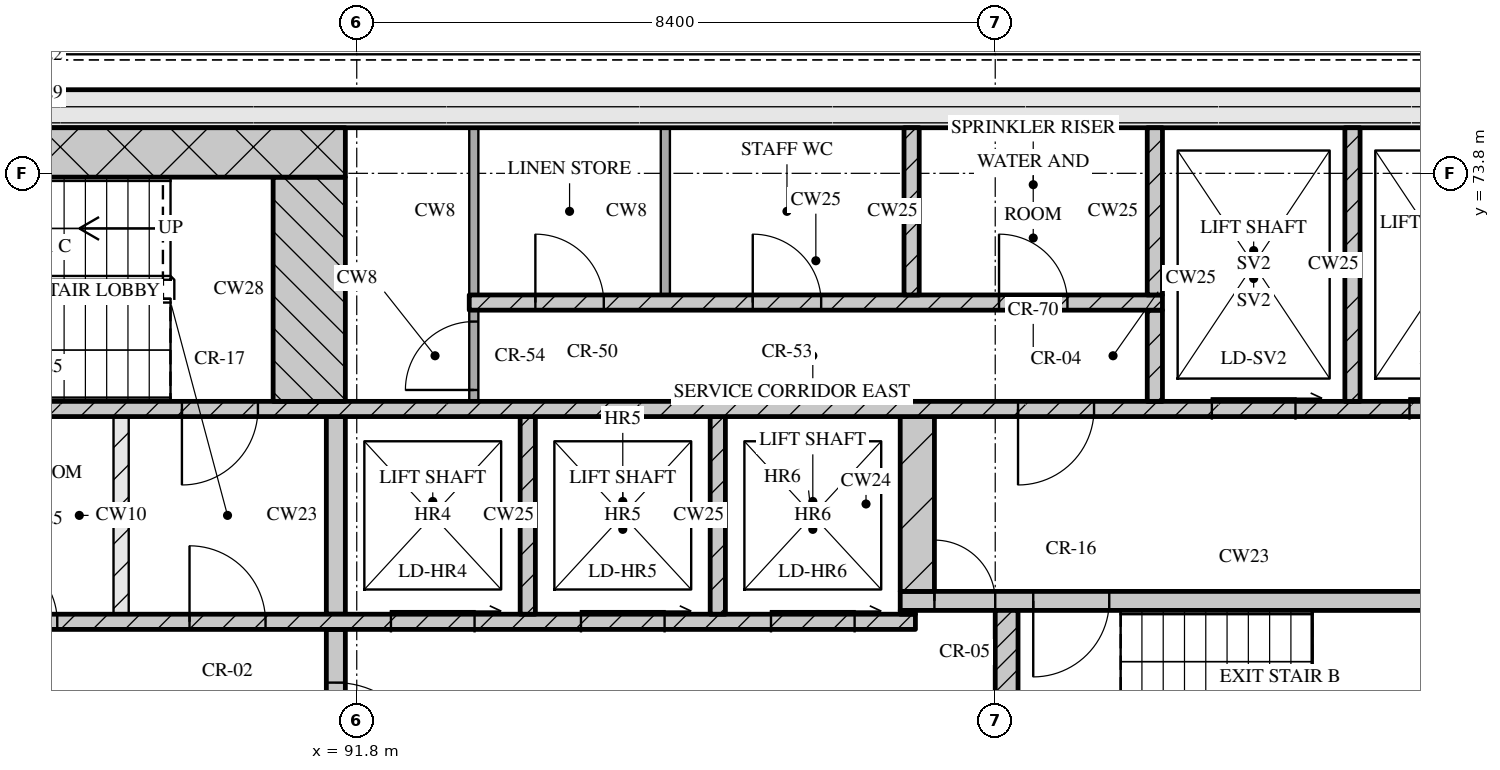
"""IFC4 building model, lengths in metres.
Left out: names, types, materials, properties, quantities, classifications, styles, units other than length and angle.
Written with IfcOpenShell. Run it as: python <this file> out.ifc"""

import sys

from ifc_helpers import new_model, si_unit, direction, frame, frame_2d, origin, place, context, subcontext, project, spatial, rectangle, extrude, element, fill, save


model = new_model("IFC4")
c1 = context("Model", 3, precision=1e-05, world=origin(), true_north=direction((0.0, 1.0)))
c2 = subcontext(c1, "Body", "Model", "MODEL_VIEW")
j1 = project(units=[si_unit("LENGTHUNIT", "METRE"), si_unit("PLANEANGLEUNIT", "RADIAN")], contexts=[c1])
p1 = place(None, origin())
s1 = spatial("IfcSite", under=j1, at=p1, CompositionType="ELEMENT")
p2 = place(p1, origin())
s2 = spatial("IfcBuilding", under=s1, at=p2, CompositionType="ELEMENT")
p3 = place(p2, frame((0.0, 0.0, 263.55)))
s3 = spatial("IfcBuildingStorey", under=s2, at=p3, CompositionType="ELEMENT", Elevation=263.55)
p4 = place(p3, frame((67.3, 74.65, 0.0), z_axis=(0.0, 0.0, 1.0), x_axis=(1.0, 0.0, 0.0)))
e1 = element("IfcWall", 1, at=p4, inside=s3, PredefinedType="SOLIDWALL", context=c2, shape_type="SweptSolid", body=[
    extrude(rectangle(XDim=40.6, YDim=0.5, at=frame_2d((20.3, 0.0))), origin(), (0.0, 0.0, 1.0), 3.32),
])
p5 = place(p3, frame((91.525, 65.2, 0.0), z_axis=(0.0, 0.0, 1.0), x_axis=(0.0, 1.0, 0.0)))
e2 = element("IfcWall", 2, at=p5, inside=s3, PredefinedType="SOLIDWALL", context=c2, shape_type="SweptSolid", body=[
    extrude(rectangle(XDim=2.6, YDim=0.25, at=frame_2d((1.3, 0.0))), origin(), (0.0, 0.0, 1.0), 3.32),
])
p6 = place(p5, frame((0.7, 0.0, 0.0)))
e3 = element("IfcOpeningElement", 3, at=p6, cuts=e2, PredefinedType="OPENING", context=c2, shape_type="SweptSolid", body=[
    extrude(rectangle(XDim=1.2, YDim=2.1, at=frame_2d((0.6, 1.05))), frame((0.0, 0.135, 0.0), z_axis=(0.0, -1.0, 0.0), x_axis=(1.0, 0.0, 0.0)), (0.0, 0.0, 1.0), 0.27),
])
p7 = place(p3, frame((100.35, 65.2, 0.0), z_axis=(0.0, 0.0, 1.0), x_axis=(0.0, 1.0, 0.0)))
e4 = element("IfcWall", 4, at=p7, inside=s3, PredefinedType="SOLIDWALL", context=c2, shape_type="SweptSolid", body=[
    extrude(rectangle(XDim=2.85, YDim=0.3, at=frame_2d((1.425, 0.0))), origin(), (0.0, 0.0, 1.0), 3.32),
])
p8 = place(p3, frame((76.05, 67.9, 0.0), z_axis=(0.0, 0.0, 1.0), x_axis=(1.0, 0.0, 0.0)))
e5 = element("IfcWall", 5, at=p8, inside=s3, PredefinedType="SOLIDWALL", context=c2, shape_type="SweptSolid", body=[
    extrude(rectangle(XDim=23.1, YDim=0.2, at=frame_2d((11.55, 0.0))), origin(), (0.0, 0.0, 1.0), 3.32),
])
p9 = place(p8, frame((1.4, 0.0, 0.0)))
e6 = element("IfcOpeningElement", 6, at=p9, cuts=e5, PredefinedType="OPENING", context=c2, shape_type="SweptSolid", body=[
    extrude(rectangle(XDim=0.9, YDim=2.1, at=frame_2d((0.45, 1.05))), frame((0.0, 0.11, 0.0), z_axis=(0.0, -1.0, 0.0), x_axis=(1.0, 0.0, 0.0)), (0.0, 0.0, 1.0), 0.22),
])
p10 = place(p8, frame((5.11, 0.0, 0.0)))
e7 = element("IfcOpeningElement", 7, at=p10, cuts=e5, PredefinedType="OPENING", context=c2, shape_type="SweptSolid", body=[
    extrude(rectangle(XDim=0.9, YDim=2.1, at=frame_2d((0.45, 1.05))), frame((0.0, 0.11, 0.0), z_axis=(0.0, -1.0, 0.0), x_axis=(1.0, 0.0, 0.0)), (0.0, 0.0, 1.0), 0.22),
])
p11 = place(p8, frame((8.45, 0.0, 0.0)))
e8 = element("IfcOpeningElement", 8, at=p11, cuts=e5, PredefinedType="OPENING", context=c2, shape_type="SweptSolid", body=[
    extrude(rectangle(XDim=0.9, YDim=2.1, at=frame_2d((0.45, 1.05))), frame((0.0, 0.11, 0.0), z_axis=(0.0, -1.0, 0.0), x_axis=(1.0, 0.0, 0.0)), (0.0, 0.0, 1.0), 0.22),
])
p12 = place(p8, frame((10.91, 0.0, 0.0)))
e9 = element("IfcOpeningElement", 9, at=p12, cuts=e5, PredefinedType="OPENING", context=c2, shape_type="SweptSolid", body=[
    extrude(rectangle(XDim=0.9, YDim=2.1, at=frame_2d((0.45, 1.05))), frame((0.0, 0.11, 0.0), z_axis=(0.0, -1.0, 0.0), x_axis=(1.0, 0.0, 0.0)), (0.0, 0.0, 1.0), 0.22),
])
p13 = place(p8, frame((13.55, 0.0, 0.0)))
e10 = element("IfcOpeningElement", 10, at=p13, cuts=e5, PredefinedType="OPENING", context=c2, shape_type="SweptSolid", body=[
    extrude(rectangle(XDim=1.0, YDim=2.1, at=frame_2d((0.5, 1.05))), frame((0.0, 0.11, 0.0), z_axis=(0.0, -1.0, 0.0), x_axis=(1.0, 0.0, 0.0)), (0.0, 0.0, 1.0), 0.22),
])
p14 = place(p8, frame((16.2, 0.0, 0.0)))
e11 = element("IfcOpeningElement", 11, at=p14, cuts=e5, PredefinedType="OPENING", context=c2, shape_type="SweptSolid", body=[
    extrude(rectangle(XDim=1.1, YDim=2.1, at=frame_2d((0.55, 1.05))), frame((0.0, 0.11, 0.0), z_axis=(0.0, -1.0, 0.0), x_axis=(1.0, 0.0, 0.0)), (0.0, 0.0, 1.0), 0.22),
])
p15 = place(p8, frame((18.7, 0.0, 0.0)))
e12 = element("IfcOpeningElement", 12, at=p15, cuts=e5, PredefinedType="OPENING", context=c2, shape_type="SweptSolid", body=[
    extrude(rectangle(XDim=1.1, YDim=2.1, at=frame_2d((0.55, 1.05))), frame((0.0, 0.11, 0.0), z_axis=(0.0, -1.0, 0.0), x_axis=(1.0, 0.0, 0.0)), (0.0, 0.0, 1.0), 0.22),
])
p16 = place(p8, frame((21.2, 0.0, 0.0)))
e13 = element("IfcOpeningElement", 13, at=p16, cuts=e5, PredefinedType="OPENING", context=c2, shape_type="SweptSolid", body=[
    extrude(rectangle(XDim=1.1, YDim=2.1, at=frame_2d((0.55, 1.05))), frame((0.0, 0.11, 0.0), z_axis=(0.0, -1.0, 0.0), x_axis=(1.0, 0.0, 0.0)), (0.0, 0.0, 1.0), 0.22),
])
p17 = place(p3, frame((88.7, 68.0, 0.0), z_axis=(0.0, 0.0, 1.0), x_axis=(0.0, 1.0, 0.0)))
e14 = element("IfcWall", 14, at=p17, inside=s3, PredefinedType="PARTITIONING", context=c2, shape_type="SweptSolid", body=[
    extrude(rectangle(XDim=2.6, YDim=0.2, at=frame_2d((1.3, 0.0))), origin(), (0.0, 0.0, 1.0), 3.32),
])
p18 = place(p3, frame((91.525, 68.0, 0.0), z_axis=(0.0, 0.0, 1.0), x_axis=(0.0, 1.0, 0.0)))
e15 = element("IfcWall", 15, at=p18, inside=s3, PredefinedType="SOLIDWALL", context=c2, shape_type="SweptSolid", body=[
    extrude(rectangle(XDim=2.6, YDim=0.25, at=frame_2d((1.3, 0.0))), origin(), (0.0, 0.0, 1.0), 3.32),
])
for number, where, z_axis, x_axis in (
    (16, (94.05, 68.0, 0.0), (0.0, 0.0, 1.0), (0.0, 1.0, 0.0)),
    (17, (96.55, 68.0, 0.0), (0.0, 0.0, 1.0), (0.0, 1.0, 0.0)),
):
    element("IfcWall", number, at=place(p3, frame(where, z_axis=z_axis, x_axis=x_axis)), inside=s3, PredefinedType="SOLIDWALL", context=c2, shape_type="SweptSolid", body=[
        extrude(rectangle(XDim=2.6, YDim=0.2, at=frame_2d((1.3, 0.0))), origin(), (0.0, 0.0, 1.0), 3.32),
    ])
p19 = place(p3, frame((98.95, 68.025, 0.0), z_axis=(0.0, 0.0, 1.0), x_axis=(1.0, 0.0, 0.0)))
e18 = element("IfcWall", 18, at=p19, inside=s3, PredefinedType="SOLIDWALL", context=c2, shape_type="SweptSolid", body=[
    extrude(rectangle(XDim=0.2, YDim=0.05, at=frame_2d((0.1, 0.0))), origin(), (0.0, 0.0, 1.0), 3.32),
])
p20 = place(p3, frame((98.95, 68.175, 0.0), z_axis=(0.0, 0.0, 1.0), x_axis=(1.0, 0.0, 0.0)))
e19 = element("IfcWall", 19, at=p20, inside=s3, PredefinedType="SOLIDWALL", context=c2, shape_type="SweptSolid", body=[
    extrude(rectangle(XDim=8.45, YDim=0.25, at=frame_2d((4.225, 0.0))), origin(), (0.0, 0.0, 1.0), 3.32),
])
p21 = place(p20, frame((0.45, 0.0, 0.0)))
e20 = element("IfcOpeningElement", 20, at=p21, cuts=e19, PredefinedType="OPENING", context=c2, shape_type="SweptSolid", body=[
    extrude(rectangle(XDim=0.8, YDim=2.1, at=frame_2d((0.4, 1.05))), frame((0.0, 0.135, 0.0), z_axis=(0.0, -1.0, 0.0), x_axis=(1.0, 0.0, 0.0)), (0.0, 0.0, 1.0), 0.27),
])
p22 = place(p20, frame((1.75, 0.0, 0.0)))
e21 = element("IfcOpeningElement", 21, at=p22, cuts=e19, PredefinedType="OPENING", context=c2, shape_type="SweptSolid", body=[
    extrude(rectangle(XDim=1.0, YDim=2.1, at=frame_2d((0.5, 1.05))), frame((0.0, 0.135, 0.0), z_axis=(0.0, -1.0, 0.0), x_axis=(1.0, 0.0, 0.0)), (0.0, 0.0, 1.0), 0.27),
])
p23 = place(p3, frame((99.175, 68.3, 0.0), z_axis=(0.0, 0.0, 1.0), x_axis=(0.0, 1.0, 0.0)))
e22 = element("IfcWall", 22, at=p23, inside=s3, PredefinedType="SOLIDWALL", context=c2, shape_type="SweptSolid", body=[
    extrude(rectangle(XDim=2.3, YDim=0.45, at=frame_2d((1.15, 0.0))), origin(), (0.0, 0.0, 1.0), 3.32),
])
p24 = place(p3, frame((67.8, 70.7, 0.0), z_axis=(0.0, 0.0, 1.0), x_axis=(1.0, 0.0, 0.0)))
e23 = element("IfcWall", 23, at=p24, inside=s3, PredefinedType="SOLIDWALL", context=c2, shape_type="SweptSolid", body=[
    extrude(rectangle(XDim=39.6, YDim=0.2, at=frame_2d((19.8, 0.0))), origin(), (0.0, 0.0, 1.0), 3.32),
])
p25 = place(p24, frame((0.65, 0.0, 0.0)))
e24 = element("IfcOpeningElement", 24, at=p25, cuts=e23, PredefinedType="OPENING", context=c2, shape_type="SweptSolid", body=[
    extrude(rectangle(XDim=1.1, YDim=2.1, at=frame_2d((0.55, 1.05))), frame((0.0, 0.11, 0.0), z_axis=(0.0, -1.0, 0.0), x_axis=(1.0, 0.0, 0.0)), (0.0, 0.0, 1.0), 0.22),
])
p26 = place(p24, frame((3.25, 0.0, 0.0)))
e25 = element("IfcOpeningElement", 25, at=p26, cuts=e23, PredefinedType="OPENING", context=c2, shape_type="SweptSolid", body=[
    extrude(rectangle(XDim=1.1, YDim=2.1, at=frame_2d((0.55, 1.05))), frame((0.0, 0.11, 0.0), z_axis=(0.0, -1.0, 0.0), x_axis=(1.0, 0.0, 0.0)), (0.0, 0.0, 1.0), 0.22),
])
p27 = place(p24, frame((5.9, 0.0, 0.0)))
e26 = element("IfcOpeningElement", 26, at=p27, cuts=e23, PredefinedType="OPENING", context=c2, shape_type="SweptSolid", body=[
    extrude(rectangle(XDim=1.0, YDim=2.1, at=frame_2d((0.5, 1.05))), frame((0.0, 0.11, 0.0), z_axis=(0.0, -1.0, 0.0), x_axis=(1.0, 0.0, 0.0)), (0.0, 0.0, 1.0), 0.22),
])
p28 = place(p24, frame((21.7, 0.0, 0.0)))
e27 = element("IfcOpeningElement", 27, at=p28, cuts=e23, PredefinedType="OPENING", context=c2, shape_type="SweptSolid", body=[
    extrude(rectangle(XDim=1.0, YDim=2.1, at=frame_2d((0.5, 1.05))), frame((0.0, 0.11, 0.0), z_axis=(0.0, -1.0, 0.0), x_axis=(1.0, 0.0, 0.0)), (0.0, 0.0, 1.0), 0.22),
])
p29 = place(p24, frame((32.7, 0.0, 0.0)))
e28 = element("IfcOpeningElement", 28, at=p29, cuts=e23, PredefinedType="OPENING", context=c2, shape_type="SweptSolid", body=[
    extrude(rectangle(XDim=1.0, YDim=2.1, at=frame_2d((0.5, 1.05))), frame((0.0, 0.11, 0.0), z_axis=(0.0, -1.0, 0.0), x_axis=(1.0, 0.0, 0.0)), (0.0, 0.0, 1.0), 0.22),
])
p30 = place(p24, frame((35.25, 0.0, 0.0)))
e29 = element("IfcOpeningElement", 29, at=p30, cuts=e23, PredefinedType="OPENING", context=c2, shape_type="SweptSolid", body=[
    extrude(rectangle(XDim=1.1, YDim=2.1, at=frame_2d((0.55, 1.05))), frame((0.0, 0.11, 0.0), z_axis=(0.0, -1.0, 0.0), x_axis=(1.0, 0.0, 0.0)), (0.0, 0.0, 1.0), 0.22),
])
p31 = place(p24, frame((37.85, 0.0, 0.0)))
e30 = element("IfcOpeningElement", 30, at=p31, cuts=e23, PredefinedType="OPENING", context=c2, shape_type="SweptSolid", body=[
    extrude(rectangle(XDim=1.1, YDim=2.1, at=frame_2d((0.55, 1.05))), frame((0.0, 0.11, 0.0), z_axis=(0.0, -1.0, 0.0), x_axis=(1.0, 0.0, 0.0)), (0.0, 0.0, 1.0), 0.22),
])
p32 = place(p3, frame((91.175, 70.8, 0.0), z_axis=(0.0, 0.0, 1.0), x_axis=(0.0, 1.0, 0.0)))
e31 = element("IfcWall", 31, at=p32, inside=s3, PredefinedType="SOLIDWALL", context=c2, shape_type="SweptSolid", body=[
    extrude(rectangle(XDim=2.95, YDim=0.95, at=frame_2d((1.475, 0.0))), origin(), (0.0, 0.0, 1.0), 3.32),
])
p33 = place(p3, frame((93.34, 70.8, 0.0), z_axis=(0.0, 0.0, 1.0), x_axis=(0.0, 1.0, 0.0)))
e32 = element("IfcWall", 32, at=p33, inside=s3, PredefinedType="PARTITIONING", context=c2, shape_type="SweptSolid", body=[
    extrude(rectangle(XDim=1.2, YDim=0.12, at=frame_2d((0.6, 0.0))), origin(), (0.0, 0.0, 1.0), 3.32),
])
p34 = place(p33, frame((0.15, 0.0, 0.0)))
e33 = element("IfcOpeningElement", 33, at=p34, cuts=e32, PredefinedType="OPENING", context=c2, shape_type="SweptSolid", body=[
    extrude(rectangle(XDim=0.9, YDim=2.1, at=frame_2d((0.45, 1.05))), frame((0.0, 0.07, 0.0), z_axis=(0.0, -1.0, 0.0), x_axis=(1.0, 0.0, 0.0)), (0.0, 0.0, 1.0), 0.14),
])
p35 = place(p3, frame((102.3, 70.8, 0.0), z_axis=(0.0, 0.0, 1.0), x_axis=(0.0, 1.0, 0.0)))
e34 = element("IfcWall", 34, at=p35, inside=s3, PredefinedType="SOLIDWALL", context=c2, shape_type="SweptSolid", body=[
    extrude(rectangle(XDim=1.2, YDim=0.2, at=frame_2d((0.6, 0.0))), origin(), (0.0, 0.0, 1.0), 3.32),
])
p36 = place(p3, frame((104.9, 70.8, 0.0), z_axis=(0.0, 0.0, 1.0), x_axis=(0.0, 1.0, 0.0)))
e35 = element("IfcWall", 35, at=p36, inside=s3, PredefinedType="SOLIDWALL", context=c2, shape_type="SweptSolid", body=[
    extrude(rectangle(XDim=3.6, YDim=0.2, at=frame_2d((1.8, 0.0))), origin(), (0.0, 0.0, 1.0), 3.32),
])
p37 = place(p3, frame((93.28, 72.1, 0.0), z_axis=(0.0, 0.0, 1.0), x_axis=(1.0, 0.0, 0.0)))
e36 = element("IfcWall", 36, at=p37, inside=s3, PredefinedType="SOLIDWALL", context=c2, shape_type="SweptSolid", body=[
    extrude(rectangle(XDim=9.12, YDim=0.2, at=frame_2d((4.56, 0.0))), origin(), (0.0, 0.0, 1.0), 3.32),
])
p38 = place(p37, frame((0.87, 0.0, 0.0)))
e37 = element("IfcOpeningElement", 37, at=p38, cuts=e36, PredefinedType="OPENING", context=c2, shape_type="SweptSolid", body=[
    extrude(rectangle(XDim=0.9, YDim=2.1, at=frame_2d((0.45, 1.05))), frame((0.0, 0.11, 0.0), z_axis=(0.0, -1.0, 0.0), x_axis=(1.0, 0.0, 0.0)), (0.0, 0.0, 1.0), 0.22),
])
p39 = place(p37, frame((3.73, 0.0, 0.0)))
e38 = element("IfcOpeningElement", 38, at=p39, cuts=e36, PredefinedType="OPENING", context=c2, shape_type="SweptSolid", body=[
    extrude(rectangle(XDim=0.9, YDim=2.1, at=frame_2d((0.45, 1.05))), frame((0.0, 0.11, 0.0), z_axis=(0.0, -1.0, 0.0), x_axis=(1.0, 0.0, 0.0)), (0.0, 0.0, 1.0), 0.22),
])
p40 = place(p37, frame((6.97, 0.0, 0.0)))
e39 = element("IfcOpeningElement", 39, at=p40, cuts=e36, PredefinedType="OPENING", context=c2, shape_type="SweptSolid", body=[
    extrude(rectangle(XDim=0.9, YDim=2.1, at=frame_2d((0.45, 1.05))), frame((0.0, 0.11, 0.0), z_axis=(0.0, -1.0, 0.0), x_axis=(1.0, 0.0, 0.0)), (0.0, 0.0, 1.0), 0.22),
])
for number, where, z_axis, x_axis in (
    (40, (93.34, 72.2, 0.0), (0.0, 0.0, 1.0), (0.0, 1.0, 0.0)),
    (41, (95.86, 72.2, 0.0), (0.0, 0.0, 1.0), (0.0, 1.0, 0.0)),
):
    element("IfcWall", number, at=place(p3, frame(where, z_axis=z_axis, x_axis=x_axis)), inside=s3, PredefinedType="PARTITIONING", context=c2, shape_type="SweptSolid", body=[
        extrude(rectangle(XDim=2.2, YDim=0.12, at=frame_2d((1.1, 0.0))), origin(), (0.0, 0.0, 1.0), 3.32),
    ])
for number, where, z_axis, x_axis in (
    (42, (99.1, 72.2, 0.0), (0.0, 0.0, 1.0), (0.0, 1.0, 0.0)),
    (43, (102.3, 72.2, 0.0), (0.0, 0.0, 1.0), (0.0, 1.0, 0.0)),
):
    element("IfcWall", number, at=place(p3, frame(where, z_axis=z_axis, x_axis=x_axis)), inside=s3, PredefinedType="SOLIDWALL", context=c2, shape_type="SweptSolid", body=[
        extrude(rectangle(XDim=2.2, YDim=0.2, at=frame_2d((1.1, 0.0))), origin(), (0.0, 0.0, 1.0), 3.32),
    ])
p41 = place(p3, frame((83.55, 74.075, 0.0), z_axis=(0.0, 0.0, 1.0), x_axis=(1.0, 0.0, 0.0)))
e44 = element("IfcWall", 44, at=p41, inside=s3, PredefinedType="SOLIDWALL", context=c2, shape_type="SweptSolid", body=[
    extrude(rectangle(XDim=8.1, YDim=0.65, at=frame_2d((4.05, 0.0))), origin(), (0.0, 0.0, 1.0), 3.32),
])
p42 = place(p6, origin())
e45 = element("IfcDoor", 45, at=p42, inside=s3, OperationType="SINGLE_SWING_RIGHT", PredefinedType="DOOR", context=c2, shape_type="SweptSolid", body=[
    extrude(rectangle(XDim=1.2, YDim=2.1, at=frame_2d((0.6, 1.05))), frame((0.0, 0.025, 0.0), z_axis=(0.0, -1.0, 0.0), x_axis=(1.0, 0.0, 0.0)), (0.0, 0.0, 1.0), 0.05),
])
fill(e3, e45)
p43 = place(p12, origin())
e46 = element("IfcDoor", 46, at=p43, inside=s3, OperationType="SINGLE_SWING_LEFT", PredefinedType="DOOR", context=c2, shape_type="SweptSolid", body=[
    extrude(rectangle(XDim=0.9, YDim=2.1, at=frame_2d((0.45, 1.05))), frame((0.0, 0.025, 0.0), z_axis=(0.0, -1.0, 0.0), x_axis=(1.0, 0.0, 0.0)), (0.0, 0.0, 1.0), 0.05),
])
fill(e9, e46)
p44 = place(p13, origin())
e47 = element("IfcDoor", 47, at=p44, inside=s3, OperationType="SINGLE_SWING_LEFT", PredefinedType="DOOR", context=c2, shape_type="SweptSolid", body=[
    extrude(rectangle(XDim=1.0, YDim=2.1, at=frame_2d((0.5, 1.05))), frame((0.0, 0.025, 0.0), z_axis=(0.0, -1.0, 0.0), x_axis=(1.0, 0.0, 0.0)), (0.0, 0.0, 1.0), 0.05),
])
fill(e10, e47)
p45 = place(p14, origin())
e48 = element("IfcDoor", 48, at=p45, inside=s3, OperationType="SLIDING_TO_RIGHT", PredefinedType="DOOR", context=c2, shape_type="SweptSolid", body=[
    extrude(rectangle(XDim=1.1, YDim=2.1, at=frame_2d((0.55, 1.05))), frame((0.0, 0.025, 0.0), z_axis=(0.0, -1.0, 0.0), x_axis=(1.0, 0.0, 0.0)), (0.0, 0.0, 1.0), 0.05),
])
fill(e11, e48)
p46 = place(p15, origin())
e49 = element("IfcDoor", 49, at=p46, inside=s3, OperationType="SLIDING_TO_RIGHT", PredefinedType="DOOR", context=c2, shape_type="SweptSolid", body=[
    extrude(rectangle(XDim=1.1, YDim=2.1, at=frame_2d((0.55, 1.05))), frame((0.0, 0.025, 0.0), z_axis=(0.0, -1.0, 0.0), x_axis=(1.0, 0.0, 0.0)), (0.0, 0.0, 1.0), 0.05),
])
fill(e12, e49)
p47 = place(p16, origin())
e50 = element("IfcDoor", 50, at=p47, inside=s3, OperationType="SLIDING_TO_RIGHT", PredefinedType="DOOR", context=c2, shape_type="SweptSolid", body=[
    extrude(rectangle(XDim=1.1, YDim=2.1, at=frame_2d((0.55, 1.05))), frame((0.0, 0.025, 0.0), z_axis=(0.0, -1.0, 0.0), x_axis=(1.0, 0.0, 0.0)), (0.0, 0.0, 1.0), 0.05),
])
fill(e13, e50)
p48 = place(p21, origin())
e51 = element("IfcDoor", 51, at=p48, inside=s3, OperationType="SINGLE_SWING_LEFT", PredefinedType="DOOR", context=c2, shape_type="SweptSolid", body=[
    extrude(rectangle(XDim=0.8, YDim=2.1, at=frame_2d((0.4, 1.05))), frame((0.0, 0.025, 0.0), z_axis=(0.0, -1.0, 0.0), x_axis=(1.0, 0.0, 0.0)), (0.0, 0.0, 1.0), 0.05),
])
fill(e20, e51)
p49 = place(p22, origin())
e52 = element("IfcDoor", 52, at=p49, inside=s3, OperationType="SINGLE_SWING_RIGHT", PredefinedType="DOOR", context=c2, shape_type="SweptSolid", body=[
    extrude(rectangle(XDim=1.0, YDim=2.1, at=frame_2d((0.5, 1.05))), frame((0.0, 0.025, 0.0), z_axis=(0.0, -1.0, 0.0), x_axis=(1.0, 0.0, 0.0)), (0.0, 0.0, 1.0), 0.05),
])
fill(e21, e52)
p50 = place(p28, origin())
e53 = element("IfcDoor", 53, at=p50, inside=s3, OperationType="SINGLE_SWING_RIGHT", PredefinedType="DOOR", context=c2, shape_type="SweptSolid", body=[
    extrude(rectangle(XDim=1.0, YDim=2.1, at=frame_2d((0.5, 1.05))), frame((0.0, 0.025, 0.0), z_axis=(0.0, -1.0, 0.0), x_axis=(1.0, 0.0, 0.0)), (0.0, 0.0, 1.0), 0.05),
])
fill(e27, e53)
p51 = place(p29, origin())
e54 = element("IfcDoor", 54, at=p51, inside=s3, OperationType="SINGLE_SWING_RIGHT", PredefinedType="DOOR", context=c2, shape_type="SweptSolid", body=[
    extrude(rectangle(XDim=1.0, YDim=2.1, at=frame_2d((0.5, 1.05))), frame((0.0, 0.025, 0.0), z_axis=(0.0, -1.0, 0.0), x_axis=(1.0, 0.0, 0.0)), (0.0, 0.0, 1.0), 0.05),
])
fill(e28, e54)
p52 = place(p30, origin())
e55 = element("IfcDoor", 55, at=p52, inside=s3, OperationType="SLIDING_TO_RIGHT", PredefinedType="DOOR", context=c2, shape_type="SweptSolid", body=[
    extrude(rectangle(XDim=1.1, YDim=2.1, at=frame_2d((0.55, 1.05))), frame((0.0, 0.025, 0.0), z_axis=(0.0, -1.0, 0.0), x_axis=(1.0, 0.0, 0.0)), (0.0, 0.0, 1.0), 0.05),
])
fill(e29, e55)
p53 = place(p31, origin())
e56 = element("IfcDoor", 56, at=p53, inside=s3, OperationType="SLIDING_TO_RIGHT", PredefinedType="DOOR", context=c2, shape_type="SweptSolid", body=[
    extrude(rectangle(XDim=1.1, YDim=2.1, at=frame_2d((0.55, 1.05))), frame((0.0, 0.025, 0.0), z_axis=(0.0, -1.0, 0.0), x_axis=(1.0, 0.0, 0.0)), (0.0, 0.0, 1.0), 0.05),
])
fill(e30, e56)
p54 = place(p34, origin())
e57 = element("IfcDoor", 57, at=p54, inside=s3, OperationType="SINGLE_SWING_LEFT", PredefinedType="DOOR", context=c2, shape_type="SweptSolid", body=[
    extrude(rectangle(XDim=0.9, YDim=2.1, at=frame_2d((0.45, 1.05))), frame((0.0, 0.025, 0.0), z_axis=(0.0, -1.0, 0.0), x_axis=(1.0, 0.0, 0.0)), (0.0, 0.0, 1.0), 0.05),
])
fill(e33, e57)
p55 = place(p38, origin())
e58 = element("IfcDoor", 58, at=p55, inside=s3, OperationType="SINGLE_SWING_LEFT", PredefinedType="DOOR", context=c2, shape_type="SweptSolid", body=[
    extrude(rectangle(XDim=0.9, YDim=2.1, at=frame_2d((0.45, 1.05))), frame((0.0, 0.025, 0.0), z_axis=(0.0, -1.0, 0.0), x_axis=(1.0, 0.0, 0.0)), (0.0, 0.0, 1.0), 0.05),
])
fill(e37, e58)
p56 = place(p39, origin())
e59 = element("IfcDoor", 59, at=p56, inside=s3, OperationType="SINGLE_SWING_LEFT", PredefinedType="DOOR", context=c2, shape_type="SweptSolid", body=[
    extrude(rectangle(XDim=0.9, YDim=2.1, at=frame_2d((0.45, 1.05))), frame((0.0, 0.025, 0.0), z_axis=(0.0, -1.0, 0.0), x_axis=(1.0, 0.0, 0.0)), (0.0, 0.0, 1.0), 0.05),
])
fill(e38, e59)
p57 = place(p40, origin())
e60 = element("IfcDoor", 60, at=p57, inside=s3, OperationType="SINGLE_SWING_LEFT", PredefinedType="DOOR", context=c2, shape_type="SweptSolid", body=[
    extrude(rectangle(XDim=0.9, YDim=2.1, at=frame_2d((0.45, 1.05))), frame((0.0, 0.025, 0.0), z_axis=(0.0, -1.0, 0.0), x_axis=(1.0, 0.0, 0.0)), (0.0, 0.0, 1.0), 0.05),
])
fill(e39, e60)
save(model, sys.argv[1])
